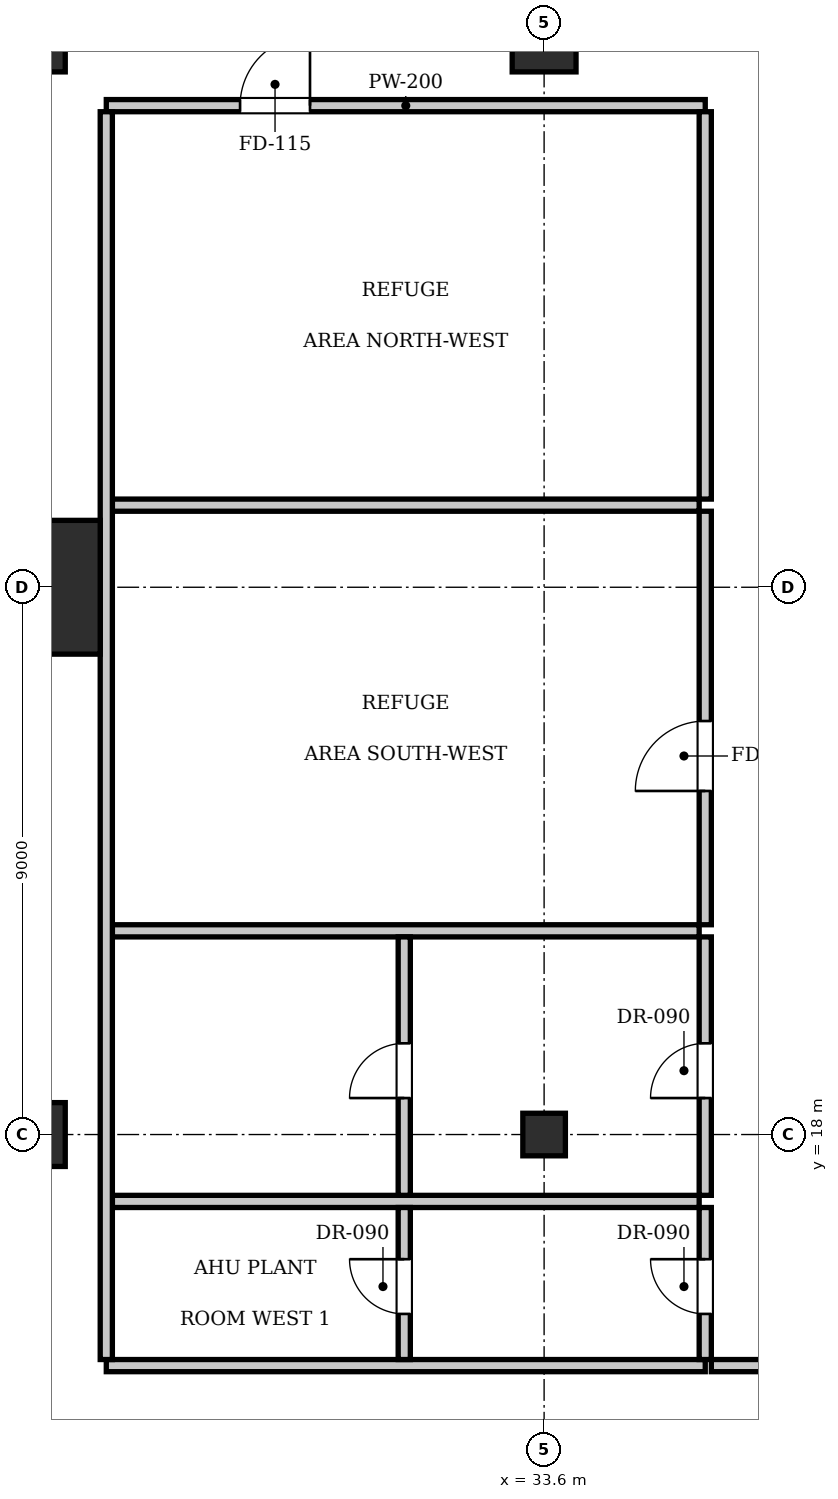
"""IFC4 building model, lengths in metres.
Left out: names, types, materials, properties, quantities, classifications, styles, units other than length and angle.
Written with IfcOpenShell. Run it as: python <this file> out.ifc"""

import sys

from ifc_helpers import new_model, si_unit, direction, frame, frame_2d, origin, origin_2d, place, context, subcontext, project, spatial, rectangle, i_section, extrude, element, fill, save


model = new_model("IFC4")
c1 = context("Model", 3, precision=1e-05, world=origin(), true_north=direction((0.0, 1.0)))
c2 = subcontext(c1, "Body", "Model", "MODEL_VIEW")
j1 = project(units=[si_unit("LENGTHUNIT", "METRE"), si_unit("PLANEANGLEUNIT", "RADIAN")], contexts=[c1])
p1 = place(None, origin())
s1 = spatial("IfcSite", under=j1, at=p1, CompositionType="ELEMENT")
p2 = place(p1, origin())
s2 = spatial("IfcBuilding", under=s1, at=p2, CompositionType="ELEMENT")
p3 = place(p2, frame((0.0, 0.0, 115.5)))
s3 = spatial("IfcBuildingStorey", under=s2, at=p3, CompositionType="ELEMENT", Elevation=115.5)
p4 = place(p3, frame((25.2, 27.0, 0.0), z_axis=(0.0, 0.0, 1.0), x_axis=(1.0, 0.0, 0.0)))
e1 = element("IfcColumn", 1, at=p4, inside=s3, PredefinedType="COLUMN", context=c2, shape_type="SweptSolid", body=[
    extrude(rectangle(XDim=2.2, YDim=2.2, at=origin_2d()), origin(), (0.0, 0.0, 1.0), 7.0),
])
for number, where, z_axis, x_axis in (
    (2, (25.2, 36.0, 0.0), (0.0, 0.0, 1.0), (1.0, 0.0, 0.0)),
    (3, (33.6, 36.0, 0.0), (0.0, 0.0, 1.0), (1.0, 0.0, 0.0)),
    (4, (25.2, 18.0, 0.0), (0.0, 0.0, 1.0), (1.0, 0.0, 0.0)),
):
    element("IfcColumn", number, at=place(p3, frame(where, z_axis=z_axis, x_axis=x_axis)), inside=s3, PredefinedType="COLUMN", context=c2, shape_type="SweptSolid", body=[
        extrude(rectangle(XDim=1.05, YDim=1.05, at=origin_2d()), origin(), (0.0, 0.0, 1.0), 7.0),
    ])
p5 = place(p3, frame((33.6, 18.0, 0.0), z_axis=(0.0, 0.0, 1.0), x_axis=(1.0, 0.0, 0.0)))
e5 = element("IfcColumn", 5, at=p5, inside=s3, PredefinedType="COLUMN", context=c2, shape_type="SweptSolid", body=[
    extrude(i_section(OverallWidth=0.7, OverallDepth=0.7, WebThickness=0.028, FlangeThickness=0.044, at=origin_2d()), origin(), (0.0, 0.0, 1.0), 7.0),
])
p6 = place(p3, frame((26.4, 34.92, 0.0), z_axis=(0.0, 0.0, 1.0), x_axis=(1.0, 0.0, 0.0)))
e6 = element("IfcWall", 6, at=p6, inside=s3, PredefinedType="PARTITIONING", context=c2, shape_type="SweptSolid", body=[
    extrude(rectangle(XDim=9.85, YDim=0.2, at=frame_2d((4.925, 0.0))), origin(), (0.0, 0.0, 1.0), 6.76),
])
p7 = place(p6, frame((2.2, 0.0, 0.0)))
e7 = element("IfcOpeningElement", 7, at=p7, cuts=e6, PredefinedType="OPENING", context=c2, shape_type="SweptSolid", body=[
    extrude(rectangle(XDim=1.15, YDim=2.15, at=frame_2d((0.575, 1.075))), frame((0.0, 0.11, 0.0), z_axis=(0.0, -1.0, 0.0), x_axis=(1.0, 0.0, 0.0)), (0.0, 0.0, 1.0), 0.22),
])
for number, where, z_axis, x_axis in (
    (8, (26.5, 28.35, 0.0), (0.0, 0.0, 1.0), (1.0, 0.0, 0.0)),
    (9, (26.5, 21.35, 0.0), (0.0, 0.0, 1.0), (1.0, 0.0, 0.0)),
    (10, (26.5, 16.9, 0.0), (0.0, 0.0, 1.0), (1.0, 0.0, 0.0)),
):
    element("IfcWall", number, at=place(p3, frame(where, z_axis=z_axis, x_axis=x_axis)), inside=s3, PredefinedType="PARTITIONING", context=c2, shape_type="SweptSolid", body=[
        extrude(rectangle(XDim=9.65, YDim=0.2, at=frame_2d((4.825, 0.0))), origin(), (0.0, 0.0, 1.0), 6.76),
    ])
p8 = place(p3, frame((26.4, 14.2, 0.0), z_axis=(0.0, 0.0, 1.0), x_axis=(1.0, 0.0, 0.0)))
e11 = element("IfcWall", 11, at=p8, inside=s3, PredefinedType="PARTITIONING", context=c2, shape_type="SweptSolid", body=[
    extrude(rectangle(XDim=9.85, YDim=0.2, at=frame_2d((4.925, 0.0))), origin(), (0.0, 0.0, 1.0), 6.76),
])
p9 = place(p3, frame((26.4, 14.3, 0.0), z_axis=(0.0, 0.0, 1.0), x_axis=(0.0, 1.0, 0.0)))
e12 = element("IfcWall", 12, at=p9, inside=s3, PredefinedType="PARTITIONING", context=c2, shape_type="SweptSolid", body=[
    extrude(rectangle(XDim=20.52, YDim=0.2, at=frame_2d((10.26, 0.0))), origin(), (0.0, 0.0, 1.0), 6.76),
])
p10 = place(p3, frame((36.25, 28.45, 0.0), z_axis=(0.0, 0.0, 1.0), x_axis=(0.0, 1.0, 0.0)))
e13 = element("IfcWall", 13, at=p10, inside=s3, PredefinedType="PARTITIONING", context=c2, shape_type="SweptSolid", body=[
    extrude(rectangle(XDim=6.37, YDim=0.2, at=frame_2d((3.185, 0.0))), origin(), (0.0, 0.0, 1.0), 6.76),
])
p11 = place(p3, frame((36.25, 21.45, 0.0), z_axis=(0.0, 0.0, 1.0), x_axis=(0.0, 1.0, 0.0)))
e14 = element("IfcWall", 14, at=p11, inside=s3, PredefinedType="PARTITIONING", context=c2, shape_type="SweptSolid", body=[
    extrude(rectangle(XDim=6.8, YDim=0.2, at=frame_2d((3.4, 0.0))), origin(), (0.0, 0.0, 1.0), 6.76),
])
p12 = place(p11, frame((2.2, 0.0, 0.0)))
e15 = element("IfcOpeningElement", 15, at=p12, cuts=e14, PredefinedType="OPENING", context=c2, shape_type="SweptSolid", body=[
    extrude(rectangle(XDim=1.15, YDim=2.15, at=frame_2d((0.575, 1.075))), frame((0.0, 0.11, 0.0), z_axis=(0.0, -1.0, 0.0), x_axis=(1.0, 0.0, 0.0)), (0.0, 0.0, 1.0), 0.22),
])
p13 = place(p3, frame((36.25, 17.0, 0.0), z_axis=(0.0, 0.0, 1.0), x_axis=(0.0, 1.0, 0.0)))
e16 = element("IfcWall", 16, at=p13, inside=s3, PredefinedType="PARTITIONING", context=c2, shape_type="SweptSolid", body=[
    extrude(rectangle(XDim=4.25, YDim=0.2, at=frame_2d((2.125, 0.0))), origin(), (0.0, 0.0, 1.0), 6.76),
])
p14 = place(p13, frame((1.6, 0.0, 0.0)))
e17 = element("IfcOpeningElement", 17, at=p14, cuts=e16, PredefinedType="OPENING", context=c2, shape_type="SweptSolid", body=[
    extrude(rectangle(XDim=0.9, YDim=2.1, at=frame_2d((0.45, 1.05))), frame((0.0, 0.11, 0.0), z_axis=(0.0, -1.0, 0.0), x_axis=(1.0, 0.0, 0.0)), (0.0, 0.0, 1.0), 0.22),
])
p15 = place(p3, frame((36.25, 14.3, 0.0), z_axis=(0.0, 0.0, 1.0), x_axis=(0.0, 1.0, 0.0)))
e18 = element("IfcWall", 18, at=p15, inside=s3, PredefinedType="PARTITIONING", context=c2, shape_type="SweptSolid", body=[
    extrude(rectangle(XDim=2.5, YDim=0.2, at=frame_2d((1.25, 0.0))), origin(), (0.0, 0.0, 1.0), 6.76),
])
p16 = place(p15, frame((0.75, 0.0, 0.0)))
e19 = element("IfcOpeningElement", 19, at=p16, cuts=e18, PredefinedType="OPENING", context=c2, shape_type="SweptSolid", body=[
    extrude(rectangle(XDim=0.9, YDim=2.1, at=frame_2d((0.45, 1.05))), frame((0.0, 0.11, 0.0), z_axis=(0.0, -1.0, 0.0), x_axis=(1.0, 0.0, 0.0)), (0.0, 0.0, 1.0), 0.22),
])
p17 = place(p3, frame((31.3, 14.3, 0.0), z_axis=(0.0, 0.0, 1.0), x_axis=(0.0, 1.0, 0.0)))
e20 = element("IfcWall", 20, at=p17, inside=s3, PredefinedType="PARTITIONING", context=c2, shape_type="SweptSolid", body=[
    extrude(rectangle(XDim=2.5, YDim=0.2, at=frame_2d((1.25, 0.0))), origin(), (0.0, 0.0, 1.0), 6.76),
])
p18 = place(p17, frame((0.75, 0.0, 0.0)))
e21 = element("IfcOpeningElement", 21, at=p18, cuts=e20, PredefinedType="OPENING", context=c2, shape_type="SweptSolid", body=[
    extrude(rectangle(XDim=0.9, YDim=2.1, at=frame_2d((0.45, 1.05))), frame((0.0, 0.11, 0.0), z_axis=(0.0, -1.0, 0.0), x_axis=(1.0, 0.0, 0.0)), (0.0, 0.0, 1.0), 0.22),
])
p19 = place(p3, frame((31.3, 17.0, 0.0), z_axis=(0.0, 0.0, 1.0), x_axis=(0.0, 1.0, 0.0)))
e22 = element("IfcWall", 22, at=p19, inside=s3, PredefinedType="PARTITIONING", context=c2, shape_type="SweptSolid", body=[
    extrude(rectangle(XDim=4.25, YDim=0.2, at=frame_2d((2.125, 0.0))), origin(), (0.0, 0.0, 1.0), 6.76),
])
p20 = place(p19, frame((1.6, 0.0, 0.0)))
e23 = element("IfcOpeningElement", 23, at=p20, cuts=e22, PredefinedType="OPENING", context=c2, shape_type="SweptSolid", body=[
    extrude(rectangle(XDim=0.9, YDim=2.1, at=frame_2d((0.45, 1.05))), frame((0.0, 0.11, 0.0), z_axis=(0.0, -1.0, 0.0), x_axis=(1.0, 0.0, 0.0)), (0.0, 0.0, 1.0), 0.22),
])
p21 = place(p3, frame((36.35, 14.2, 0.0), z_axis=(0.0, 0.0, 1.0), x_axis=(1.0, 0.0, 0.0)))
e24 = element("IfcWall", 24, at=p21, inside=s3, PredefinedType="PARTITIONING", context=c2, shape_type="SweptSolid", body=[
    extrude(rectangle(XDim=2.9, YDim=0.2, at=frame_2d((1.45, 0.0))), origin(), (0.0, 0.0, 1.0), 6.76),
])
p22 = place(p21, frame((0.875, 0.0, 0.0)))
e25 = element("IfcOpeningElement", 25, at=p22, cuts=e24, PredefinedType="OPENING", context=c2, shape_type="SweptSolid", body=[
    extrude(rectangle(XDim=1.15, YDim=2.15, at=frame_2d((0.575, 1.075))), frame((0.0, 0.11, 0.0), z_axis=(0.0, -1.0, 0.0), x_axis=(1.0, 0.0, 0.0)), (0.0, 0.0, 1.0), 0.22),
])
p23 = place(p7, origin())
e26 = element("IfcDoor", 26, at=p23, inside=s3, OperationType="SINGLE_SWING_RIGHT", PredefinedType="DOOR", context=c2, shape_type="SweptSolid", body=[
    extrude(rectangle(XDim=1.15, YDim=2.15, at=frame_2d((0.575, 1.075))), frame((0.0, 0.025, 0.0), z_axis=(0.0, -1.0, 0.0), x_axis=(1.0, 0.0, 0.0)), (0.0, 0.0, 1.0), 0.05),
])
fill(e7, e26)
p24 = place(p12, origin())
e27 = element("IfcDoor", 27, at=p24, inside=s3, OperationType="SINGLE_SWING_LEFT", PredefinedType="DOOR", context=c2, shape_type="SweptSolid", body=[
    extrude(rectangle(XDim=1.15, YDim=2.15, at=frame_2d((0.575, 1.075))), frame((0.0, 0.025, 0.0), z_axis=(0.0, -1.0, 0.0), x_axis=(1.0, 0.0, 0.0)), (0.0, 0.0, 1.0), 0.05),
])
fill(e15, e27)
p25 = place(p16, origin())
e28 = element("IfcDoor", 28, at=p25, inside=s3, OperationType="SINGLE_SWING_RIGHT", PredefinedType="DOOR", context=c2, shape_type="SweptSolid", body=[
    extrude(rectangle(XDim=0.9, YDim=2.1, at=frame_2d((0.45, 1.05))), frame((0.0, 0.025, 0.0), z_axis=(0.0, -1.0, 0.0), x_axis=(1.0, 0.0, 0.0)), (0.0, 0.0, 1.0), 0.05),
])
fill(e19, e28)
p26 = place(p14, origin())
e29 = element("IfcDoor", 29, at=p26, inside=s3, OperationType="SINGLE_SWING_LEFT", PredefinedType="DOOR", context=c2, shape_type="SweptSolid", body=[
    extrude(rectangle(XDim=0.9, YDim=2.1, at=frame_2d((0.45, 1.05))), frame((0.0, 0.025, 0.0), z_axis=(0.0, -1.0, 0.0), x_axis=(1.0, 0.0, 0.0)), (0.0, 0.0, 1.0), 0.05),
])
fill(e17, e29)
p27 = place(p18, origin())
e30 = element("IfcDoor", 30, at=p27, inside=s3, OperationType="SINGLE_SWING_RIGHT", PredefinedType="DOOR", context=c2, shape_type="SweptSolid", body=[
    extrude(rectangle(XDim=0.9, YDim=2.1, at=frame_2d((0.45, 1.05))), frame((0.0, 0.025, 0.0), z_axis=(0.0, -1.0, 0.0), x_axis=(1.0, 0.0, 0.0)), (0.0, 0.0, 1.0), 0.05),
])
fill(e21, e30)
p28 = place(p20, origin())
e31 = element("IfcDoor", 31, at=p28, inside=s3, OperationType="SINGLE_SWING_LEFT", PredefinedType="DOOR", context=c2, shape_type="SweptSolid", body=[
    extrude(rectangle(XDim=0.9, YDim=2.1, at=frame_2d((0.45, 1.05))), frame((0.0, 0.025, 0.0), z_axis=(0.0, -1.0, 0.0), x_axis=(1.0, 0.0, 0.0)), (0.0, 0.0, 1.0), 0.05),
])
fill(e23, e31)
save(model, sys.argv[1])
